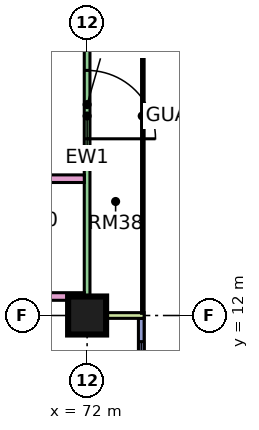
"""IFC4 building model, lengths in metres.
Left out: names, types, materials, properties, quantities, classifications, styles, units other than length and angle.
Written with IfcOpenShell. Run it as: python <this file> out.ifc"""

import sys

from ifc_helpers import new_model, si_unit, direction, frame, frame_2d, origin, origin_2d, place, context, subcontext, project, spatial, rectangle, extrude, element, fill, save


model = new_model("IFC4")
c1 = context("Model", 3, precision=1e-05, world=origin(), true_north=direction((0.0, 1.0)))
c2 = subcontext(c1, "Body", "Model", "MODEL_VIEW")
j1 = project(units=[si_unit("LENGTHUNIT", "METRE"), si_unit("PLANEANGLEUNIT", "RADIAN")], contexts=[c1])
p1 = place(None, origin())
s1 = spatial("IfcSite", under=j1, at=p1, CompositionType="ELEMENT")
p2 = place(p1, origin())
s2 = spatial("IfcBuilding", under=s1, at=p2, CompositionType="ELEMENT")
p3 = place(p2, frame((0.0, 0.0, 103.15)))
s3 = spatial("IfcBuildingStorey", under=s2, at=p3, CompositionType="ELEMENT", Elevation=103.15)
p4 = place(p3, frame((72.0, 12.0, 0.0), z_axis=(0.0, 0.0, 1.0), x_axis=(1.0, 0.0, 0.0)))
e1 = element("IfcColumn", 1, at=p4, inside=s3, PredefinedType="COLUMN", context=c2, shape_type="SweptSolid", body=[
    extrude(rectangle(XDim=1.0, YDim=1.0, at=origin_2d()), origin(), (0.0, 0.0, 1.0), 3.75),
])
p5 = place(p3, frame((73.425, 1.5, 0.0), z_axis=(0.0, 0.0, 1.0), x_axis=(0.0, 1.0, 0.0)))
e2 = element("IfcWall", 2, at=p5, inside=s3, PredefinedType="SOLIDWALL", context=c2, shape_type="SweptSolid", body=[
    extrude(rectangle(XDim=10.425, YDim=0.15, at=frame_2d((5.212, 0.0))), origin(), (0.0, 0.0, 1.0), 3.35),
])
p6 = place(p5, frame((1.3, 0.0, 0.45)))
e3 = element("IfcOpeningElement", 3, at=p6, cuts=e2, PredefinedType="OPENING", context=c2, shape_type="SweptSolid", body=[
    extrude(rectangle(XDim=3.0, YDim=2.4, at=frame_2d((1.5, 1.2))), frame((0.0, 0.085, 0.0), z_axis=(0.0, -1.0, 0.0), x_axis=(1.0, 0.0, 0.0)), (0.0, 0.0, 1.0), 0.17),
])
p7 = place(p5, frame((7.413, 0.0, 0.45)))
e4 = element("IfcOpeningElement", 4, at=p7, cuts=e2, PredefinedType="OPENING", context=c2, shape_type="SweptSolid", body=[
    extrude(rectangle(XDim=2.4, YDim=2.4, at=frame_2d((1.2, 1.2))), frame((0.0, 0.085, 0.0), z_axis=(0.0, -1.0, 0.0), x_axis=(1.0, 0.0, 0.0)), (0.0, 0.0, 1.0), 0.17),
])
p8 = place(p3, frame((72.0, 12.075, 0.0), z_axis=(0.0, 0.0, 1.0), x_axis=(0.0, 1.0, 0.0)))
e5 = element("IfcWall", 5, at=p8, inside=s3, PredefinedType="SOLIDWALL", context=c2, shape_type="SweptSolid", body=[
    extrude(rectangle(XDim=10.35, YDim=0.15, at=frame_2d((5.175, 0.0))), origin(), (0.0, 0.0, 1.0), 3.35),
])
p9 = place(p8, frame((4.575, 0.0, 0.0)))
e6 = element("IfcOpeningElement", 6, at=p9, cuts=e5, PredefinedType="OPENING", context=c2, shape_type="SweptSolid", body=[
    extrude(rectangle(XDim=1.8, YDim=2.4, at=frame_2d((0.9, 1.2))), frame((0.0, 0.085, 0.0), z_axis=(0.0, -1.0, 0.0), x_axis=(1.0, 0.0, 0.0)), (0.0, 0.0, 1.0), 0.17),
])
p10 = place(p8, frame((7.988, 0.0, 0.45)))
e7 = element("IfcOpeningElement", 7, at=p10, cuts=e5, PredefinedType="OPENING", context=c2, shape_type="SweptSolid", body=[
    extrude(rectangle(XDim=1.8, YDim=2.4, at=frame_2d((0.9, 1.2))), frame((0.0, 0.085, 0.0), z_axis=(0.0, -1.0, 0.0), x_axis=(1.0, 0.0, 0.0)), (0.0, 0.0, 1.0), 0.17),
])
p11 = place(p3, frame((73.5, 12.0, 0.0), z_axis=(0.0, 0.0, 1.0), x_axis=(-1.0, 0.0, 0.0)))
e8 = element("IfcWall", 8, at=p11, inside=s3, PredefinedType="SOLIDWALL", context=c2, shape_type="SweptSolid", body=[
    extrude(rectangle(XDim=1.5, YDim=0.15, at=frame_2d((0.75, 0.0))), origin(), (0.0, 0.0, 1.0), 3.35),
])
p12 = place(p3, frame((40.65, 12.5, 0.0), z_axis=(0.0, 0.0, 1.0), x_axis=(1.0, 0.0, 0.0)))
e9 = element("IfcWall", 9, at=p12, inside=s3, PredefinedType="PARTITIONING", context=c2, shape_type="SweptSolid", body=[
    extrude(rectangle(XDim=31.276, YDim=0.2, at=frame_2d((15.638, 0.0))), origin(), (0.0, 0.0, 1.0), 3.35),
])
p13 = place(p12, frame((14.25, 0.0, 0.0)))
e10 = element("IfcOpeningElement", 10, at=p13, cuts=e9, PredefinedType="OPENING", context=c2, shape_type="SweptSolid", body=[
    extrude(rectangle(XDim=1.0, YDim=2.1, at=frame_2d((0.5, 1.05))), frame((0.0, 0.11, 0.0), z_axis=(0.0, -1.0, 0.0), x_axis=(1.0, 0.0, 0.0)), (0.0, 0.0, 1.0), 0.22),
])
p14 = place(p12, frame((1.05, 0.0, 0.0)))
e11 = element("IfcOpeningElement", 11, at=p14, cuts=e9, PredefinedType="OPENING", context=c2, shape_type="SweptSolid", body=[
    extrude(rectangle(XDim=1.0, YDim=2.1, at=frame_2d((0.5, 1.05))), frame((0.0, 0.11, 0.0), z_axis=(0.0, -1.0, 0.0), x_axis=(1.0, 0.0, 0.0)), (0.0, 0.0, 1.0), 0.22),
])
p15 = place(p3, frame((51.225, 15.6, 0.0), z_axis=(0.0, 0.0, 1.0), x_axis=(1.0, 0.0, 0.0)))
e12 = element("IfcWall", 12, at=p15, inside=s3, PredefinedType="PARTITIONING", context=c2, shape_type="SweptSolid", body=[
    extrude(rectangle(XDim=20.701, YDim=0.2, at=frame_2d((10.351, 0.0))), origin(), (0.0, 0.0, 1.0), 3.35),
])
p16 = place(p15, frame((18.425, 0.0, 0.0)))
e13 = element("IfcOpeningElement", 13, at=p16, cuts=e12, PredefinedType="OPENING", context=c2, shape_type="SweptSolid", body=[
    extrude(rectangle(XDim=1.0, YDim=2.1, at=frame_2d((0.5, 1.05))), frame((0.0, 0.11, 0.0), z_axis=(0.0, -1.0, 0.0), x_axis=(1.0, 0.0, 0.0)), (0.0, 0.0, 1.0), 0.22),
])
p17 = place(p15, frame((0.875, 0.0, 0.0)))
e14 = element("IfcOpeningElement", 14, at=p17, cuts=e12, PredefinedType="OPENING", context=c2, shape_type="SweptSolid", body=[
    extrude(rectangle(XDim=1.0, YDim=2.1, at=frame_2d((0.5, 1.05))), frame((0.0, 0.11, 0.0), z_axis=(0.0, -1.0, 0.0), x_axis=(1.0, 0.0, 0.0)), (0.0, 0.0, 1.0), 0.22),
])
p18 = place(p7, origin())
e15 = element("IfcWindow", 15, at=p18, inside=s3, PartitioningType="SINGLE_PANEL", PredefinedType="WINDOW", context=c2, shape_type="SweptSolid", body=[
    extrude(rectangle(XDim=2.4, YDim=2.4, at=frame_2d((1.2, 1.2))), frame((0.0, 0.03, 0.0), z_axis=(0.0, -1.0, 0.0), x_axis=(1.0, 0.0, 0.0)), (0.0, 0.0, 1.0), 0.06),
])
fill(e4, e15)
p19 = place(p9, frame((1.8, 0.0, 0.0), z_axis=(0.0, 0.0, 1.0), x_axis=(-1.0, 0.0, 0.0)))
e16 = element("IfcDoor", 16, at=p19, inside=s3, OperationType="DOUBLE_DOOR_SINGLE_SWING", PredefinedType="DOOR", context=c2, shape_type="SweptSolid", body=[
    extrude(rectangle(XDim=1.8, YDim=2.4, at=frame_2d((0.9, 1.2))), frame((0.0, 0.025, 0.0), z_axis=(0.0, -1.0, 0.0), x_axis=(1.0, 0.0, 0.0)), (0.0, 0.0, 1.0), 0.05),
])
fill(e6, e16)
save(model, sys.argv[1])
